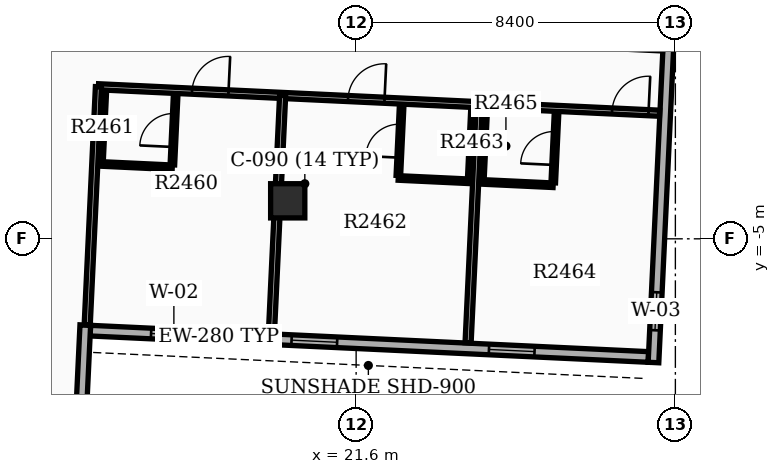
"""IFC4 building model, lengths in metres.
Left out: names, types, materials, properties, quantities, classifications, styles, units other than length and angle.
Written with IfcOpenShell. Run it as: python <this file> out.ifc"""

import sys

from ifc_helpers import new_model, si_unit, direction, frame, frame_2d, origin, origin_2d, place, context, subcontext, project, spatial, rectangle, extrude, element, fill, save


model = new_model("IFC4")
c1 = context("Model", 3, precision=1e-05, world=origin(), true_north=direction((0.0, 1.0)))
c2 = subcontext(c1, "Body", "Model", "MODEL_VIEW")
j1 = project(units=[si_unit("LENGTHUNIT", "METRE"), si_unit("PLANEANGLEUNIT", "RADIAN")], contexts=[c1])
p1 = place(None, origin())
s1 = spatial("IfcSite", under=j1, at=p1, CompositionType="ELEMENT")
p2 = place(p1, origin())
s2 = spatial("IfcBuilding", under=s1, at=p2, CompositionType="ELEMENT")
p3 = place(p2, frame((0.0, 0.0, 156.6)))
s3 = spatial("IfcBuildingStorey", under=s2, at=p3, CompositionType="ELEMENT", Elevation=156.6)
p4 = place(p3, frame((19.8, -4.0, 0.0), z_axis=(0.0, 0.0, 1.0), x_axis=(1.0, 0.0, 0.0)))
e1 = element("IfcColumn", 1, at=p4, inside=s3, PredefinedType="COLUMN", context=c2, shape_type="SweptSolid", body=[
    extrude(rectangle(XDim=0.9, YDim=0.9, at=origin_2d()), origin(), (0.0, 0.0, 1.0), 3.9),
])
p5 = place(p3, frame((14.607, -7.416, 0.0), z_axis=(0.0, 0.0, 1.0), x_axis=(0.998889342735, -0.047117735191, 0.0)))
e2 = element("IfcWall", 2, at=p5, inside=s3, PredefinedType="STANDARD", context=c2, shape_type="SweptSolid", body=[
    extrude(rectangle(XDim=14.7, YDim=0.28, at=frame_2d((7.35, 0.0))), origin(), (0.0, 0.0, 1.0), 2.97),
])
p6 = place(p5, frame((1.6, 0.0, 0.8)))
e3 = element("IfcOpeningElement", 3, at=p6, cuts=e2, PredefinedType="OPENING", context=c2, shape_type="SweptSolid", body=[
    extrude(rectangle(XDim=1.2, YDim=1.6, at=frame_2d((0.6, 0.8))), frame((0.0, 0.15, 0.0), z_axis=(0.0, -1.0, 0.0), x_axis=(1.0, 0.0, 0.0)), (0.0, 0.0, 1.0), 0.3),
])
p7 = place(p5, frame((5.3, 0.0, 0.8)))
e4 = element("IfcOpeningElement", 4, at=p7, cuts=e2, PredefinedType="OPENING", context=c2, shape_type="SweptSolid", body=[
    extrude(rectangle(XDim=1.2, YDim=1.6, at=frame_2d((0.6, 0.8))), frame((0.0, 0.15, 0.0), z_axis=(0.0, -1.0, 0.0), x_axis=(1.0, 0.0, 0.0)), (0.0, 0.0, 1.0), 0.3),
])
p8 = place(p5, frame((10.5, 0.0, 0.8)))
e5 = element("IfcOpeningElement", 5, at=p8, cuts=e2, PredefinedType="OPENING", context=c2, shape_type="SweptSolid", body=[
    extrude(rectangle(XDim=1.2, YDim=1.6, at=frame_2d((0.6, 0.8))), frame((0.0, 0.15, 0.0), z_axis=(0.0, -1.0, 0.0), x_axis=(1.0, 0.0, 0.0)), (0.0, 0.0, 1.0), 0.3),
])
p9 = place(p3, frame((29.424, -8.255, 0.0), z_axis=(0.0, 0.0, 1.0), x_axis=(0.047101845086, 0.998890092147, 0.0)))
e6 = element("IfcWall", 6, at=p9, inside=s3, PredefinedType="STANDARD", context=c2, shape_type="SweptSolid", body=[
    extrude(rectangle(XDim=13.72, YDim=0.28, at=frame_2d((6.86, 0.0))), origin(), (0.0, 0.0, 1.0), 2.97),
])
p10 = place(p9, frame((0.85, 0.0, 0.85)))
e7 = element("IfcOpeningElement", 7, at=p10, cuts=e6, PredefinedType="OPENING", context=c2, shape_type="SweptSolid", body=[
    extrude(rectangle(XDim=1.0, YDim=1.5, at=frame_2d((0.5, 0.75))), frame((0.0, 0.15, 0.0), z_axis=(0.0, -1.0, 0.0), x_axis=(1.0, 0.0, 0.0)), (0.0, 0.0, 1.0), 0.3),
])
p11 = place(p3, frame((14.474, -7.27, 0.0), z_axis=(0.0, 0.0, 1.0), x_axis=(-0.04712043756, -0.998889215261, 0.0)))
e8 = element("IfcWall", 8, at=p11, inside=s3, PredefinedType="STANDARD", context=c2, shape_type="SweptSolid", body=[
    extrude(rectangle(XDim=6.86, YDim=0.28, at=frame_2d((3.43, 0.0))), origin(), (0.0, 0.0, 1.0), 2.97),
])
p12 = place(p3, frame((14.819, -0.999, 0.0), z_axis=(0.0, 0.0, 1.0), x_axis=(0.99889000272, -0.04710374153, 0.0)))
e9 = element("IfcWall", 9, at=p12, inside=s3, PredefinedType="PARTITIONING", context=c2, shape_type="SweptSolid", body=[
    extrude(rectangle(XDim=14.782, YDim=0.16, at=frame_2d((7.391, 0.0))), origin(), (0.0, 0.0, 1.0), 2.96),
])
p13 = place(p12, frame((2.465, 0.0, 0.0)))
e10 = element("IfcOpeningElement", 10, at=p13, cuts=e9, PredefinedType="OPENING", context=c2, shape_type="SweptSolid", body=[
    extrude(rectangle(XDim=0.96, YDim=2.15, at=frame_2d((0.48, 1.075))), frame((0.0, 0.09, 0.0), z_axis=(0.0, -1.0, 0.0), x_axis=(1.0, 0.0, 0.0)), (0.0, 0.0, 1.0), 0.18),
])
p14 = place(p12, frame((6.575, 0.0, 0.0)))
e11 = element("IfcOpeningElement", 11, at=p14, cuts=e9, PredefinedType="OPENING", context=c2, shape_type="SweptSolid", body=[
    extrude(rectangle(XDim=0.96, YDim=2.15, at=frame_2d((0.48, 1.075))), frame((0.0, 0.09, 0.0), z_axis=(0.0, -1.0, 0.0), x_axis=(1.0, 0.0, 0.0)), (0.0, 0.0, 1.0), 0.18),
])
p15 = place(p12, frame((13.53, 0.0, 0.0)))
e12 = element("IfcOpeningElement", 12, at=p15, cuts=e9, PredefinedType="OPENING", context=c2, shape_type="SweptSolid", body=[
    extrude(rectangle(XDim=0.96, YDim=2.15, at=frame_2d((0.48, 1.075))), frame((0.0, 0.09, 0.0), z_axis=(0.0, -1.0, 0.0), x_axis=(1.0, 0.0, 0.0)), (0.0, 0.0, 1.0), 0.18),
])
for number, where, z_axis, x_axis in (
    (13, (14.819, -0.999, 0.0), (0.0, 0.0, 1.0), (-0.047, -0.999, 0.0)),
    (14, (19.666, -1.228, 0.0), (0.0, 0.0, 1.0), (-0.047, -0.999, 0.0)),
):
    element("IfcWall", number, at=place(p3, frame(where, z_axis=z_axis, x_axis=x_axis)), inside=s3, PredefinedType="PARTITIONING", context=c2, shape_type="SweptSolid", body=[
        extrude(rectangle(XDim=6.272, YDim=0.16, at=frame_2d((3.136, 0.0))), origin(), (0.0, 0.0, 1.0), 2.96),
    ])
p16 = place(p3, frame((16.765, -3.053, 0.0), z_axis=(0.0, 0.0, 1.0), x_axis=(0.047087116047, 0.998890786574, 0.0)))
e15 = element("IfcWall", 15, at=p16, inside=s3, PredefinedType="PARTITIONING", context=c2, shape_type="SweptSolid", body=[
    extrude(rectangle(XDim=1.82, YDim=0.12, at=frame_2d((0.91, 0.0))), origin(), (0.0, 0.0, 1.0), 2.96),
])
p17 = place(p16, frame((0.47, 0.0, 0.0)))
e16 = element("IfcOpeningElement", 16, at=p17, cuts=e15, PredefinedType="OPENING", context=c2, shape_type="SweptSolid", body=[
    extrude(rectangle(XDim=0.88, YDim=2.1, at=frame_2d((0.44, 1.05))), frame((0.0, 0.07, 0.0), z_axis=(0.0, -1.0, 0.0), x_axis=(1.0, 0.0, 0.0)), (0.0, 0.0, 1.0), 0.14),
])
p18 = place(p3, frame((14.887, -2.965, 0.0), z_axis=(0.0, 0.0, 1.0), x_axis=(0.047080807099, 0.998891083954, 0.0)))
e17 = element("IfcWall", 17, at=p18, inside=s3, PredefinedType="PARTITIONING", context=c2, shape_type="SweptSolid", body=[
    extrude(rectangle(XDim=1.82, YDim=0.12, at=frame_2d((0.91, 0.0))), origin(), (0.0, 0.0, 1.0), 2.96),
])
p19 = place(p3, frame((14.884, -3.03, 0.0), z_axis=(0.0, 0.0, 1.0), x_axis=(0.998894425757, -0.04700985207, 0.0)))
e18 = element("IfcWall", 18, at=p19, inside=s3, PredefinedType="PARTITIONING", context=c2, shape_type="SweptSolid", body=[
    extrude(rectangle(XDim=1.88, YDim=0.12, at=frame_2d((0.94, 0.0))), origin(), (0.0, 0.0, 1.0), 2.96),
])
p20 = place(p3, frame((24.841, -1.472, 0.0), z_axis=(0.0, 0.0, 1.0), x_axis=(-0.047099102485, -0.998890221468, 0.0)))
e19 = element("IfcWall", 19, at=p20, inside=s3, PredefinedType="PARTITIONING", context=c2, shape_type="SweptSolid", body=[
    extrude(rectangle(XDim=6.272, YDim=0.16, at=frame_2d((3.136, 0.0))), origin(), (0.0, 0.0, 1.0), 2.96),
])
p21 = place(p3, frame((22.711, -3.333, 0.0), z_axis=(0.0, 0.0, 1.0), x_axis=(0.047087116047, 0.998890786574, 0.0)))
e20 = element("IfcWall", 20, at=p21, inside=s3, PredefinedType="PARTITIONING", context=c2, shape_type="SweptSolid", body=[
    extrude(rectangle(XDim=1.82, YDim=0.12, at=frame_2d((0.91, 0.0))), origin(), (0.0, 0.0, 1.0), 2.96),
])
p22 = place(p21, frame((0.47, 0.0, 0.0)))
e21 = element("IfcOpeningElement", 21, at=p22, cuts=e20, PredefinedType="OPENING", context=c2, shape_type="SweptSolid", body=[
    extrude(rectangle(XDim=0.88, YDim=2.1, at=frame_2d((0.44, 1.05))), frame((0.0, 0.07, 0.0), z_axis=(0.0, -1.0, 0.0), x_axis=(1.0, 0.0, 0.0)), (0.0, 0.0, 1.0), 0.14),
])
p23 = place(p3, frame((24.589, -3.422, 0.0), z_axis=(0.0, 0.0, 1.0), x_axis=(0.047080807099, 0.998891083954, 0.0)))
e22 = element("IfcWall", 22, at=p23, inside=s3, PredefinedType="PARTITIONING", context=c2, shape_type="SweptSolid", body=[
    extrude(rectangle(XDim=1.82, YDim=0.12, at=frame_2d((0.91, 0.0))), origin(), (0.0, 0.0, 1.0), 2.96),
])
p24 = place(p3, frame((22.708, -3.398, 0.0), z_axis=(0.0, 0.0, 1.0), x_axis=(0.998888319371, -0.047139425368, 0.0)))
e23 = element("IfcWall", 23, at=p24, inside=s3, PredefinedType="PARTITIONING", context=c2, shape_type="SweptSolid", body=[
    extrude(rectangle(XDim=1.88, YDim=0.12, at=frame_2d((0.94, 0.0))), origin(), (0.0, 0.0, 1.0), 2.96),
])
p25 = place(p3, frame((26.787, -3.526, 0.0), z_axis=(0.0, 0.0, 1.0), x_axis=(0.047087116047, 0.998890786574, 0.0)))
e24 = element("IfcWall", 24, at=p25, inside=s3, PredefinedType="PARTITIONING", context=c2, shape_type="SweptSolid", body=[
    extrude(rectangle(XDim=1.82, YDim=0.12, at=frame_2d((0.91, 0.0))), origin(), (0.0, 0.0, 1.0), 2.96),
])
p26 = place(p25, frame((0.47, 0.0, 0.0)))
e25 = element("IfcOpeningElement", 25, at=p26, cuts=e24, PredefinedType="OPENING", context=c2, shape_type="SweptSolid", body=[
    extrude(rectangle(XDim=0.88, YDim=2.1, at=frame_2d((0.44, 1.05))), frame((0.0, 0.07, 0.0), z_axis=(0.0, -1.0, 0.0), x_axis=(1.0, 0.0, 0.0)), (0.0, 0.0, 1.0), 0.14),
])
p27 = place(p3, frame((24.909, -3.437, 0.0), z_axis=(0.0, 0.0, 1.0), x_axis=(0.047080807099, 0.998891083954, 0.0)))
e26 = element("IfcWall", 26, at=p27, inside=s3, PredefinedType="PARTITIONING", context=c2, shape_type="SweptSolid", body=[
    extrude(rectangle(XDim=1.82, YDim=0.12, at=frame_2d((0.91, 0.0))), origin(), (0.0, 0.0, 1.0), 2.96),
])
p28 = place(p3, frame((24.906, -3.502, 0.0), z_axis=(0.0, 0.0, 1.0), x_axis=(0.998888319371, -0.047139425368, 0.0)))
e27 = element("IfcWall", 27, at=p28, inside=s3, PredefinedType="PARTITIONING", context=c2, shape_type="SweptSolid", body=[
    extrude(rectangle(XDim=1.88, YDim=0.12, at=frame_2d((0.94, 0.0))), origin(), (0.0, 0.0, 1.0), 2.96),
])
p29 = place(p6, origin())
e28 = element("IfcWindow", 28, at=p29, inside=s3, PartitioningType="SINGLE_PANEL", PredefinedType="WINDOW", context=c2, shape_type="SweptSolid", body=[
    extrude(rectangle(XDim=1.2, YDim=1.6, at=frame_2d((0.6, 0.8))), frame((0.0, 0.03, 0.0), z_axis=(0.0, -1.0, 0.0), x_axis=(1.0, 0.0, 0.0)), (0.0, 0.0, 1.0), 0.06),
])
fill(e3, e28)
p30 = place(p7, origin())
e29 = element("IfcWindow", 29, at=p30, inside=s3, PartitioningType="SINGLE_PANEL", PredefinedType="WINDOW", context=c2, shape_type="SweptSolid", body=[
    extrude(rectangle(XDim=1.2, YDim=1.6, at=frame_2d((0.6, 0.8))), frame((0.0, 0.03, 0.0), z_axis=(0.0, -1.0, 0.0), x_axis=(1.0, 0.0, 0.0)), (0.0, 0.0, 1.0), 0.06),
])
fill(e4, e29)
p31 = place(p8, origin())
e30 = element("IfcWindow", 30, at=p31, inside=s3, PartitioningType="SINGLE_PANEL", PredefinedType="WINDOW", context=c2, shape_type="SweptSolid", body=[
    extrude(rectangle(XDim=1.2, YDim=1.6, at=frame_2d((0.6, 0.8))), frame((0.0, 0.03, 0.0), z_axis=(0.0, -1.0, 0.0), x_axis=(1.0, 0.0, 0.0)), (0.0, 0.0, 1.0), 0.06),
])
fill(e5, e30)
p32 = place(p10, origin())
e31 = element("IfcWindow", 31, at=p32, inside=s3, PartitioningType="SINGLE_PANEL", PredefinedType="WINDOW", context=c2, shape_type="SweptSolid", body=[
    extrude(rectangle(XDim=1.0, YDim=1.5, at=frame_2d((0.5, 0.75))), frame((0.0, 0.03, 0.0), z_axis=(0.0, -1.0, 0.0), x_axis=(1.0, 0.0, 0.0)), (0.0, 0.0, 1.0), 0.06),
])
fill(e7, e31)
p33 = place(p13, origin())
e32 = element("IfcDoor", 32, at=p33, inside=s3, OperationType="SINGLE_SWING_RIGHT", PredefinedType="DOOR", context=c2, shape_type="SweptSolid", body=[
    extrude(rectangle(XDim=0.96, YDim=2.15, at=frame_2d((0.48, 1.075))), frame((0.0, 0.025, 0.0), z_axis=(0.0, -1.0, 0.0), x_axis=(1.0, 0.0, 0.0)), (0.0, 0.0, 1.0), 0.05),
])
fill(e10, e32)
p34 = place(p17, origin())
e33 = element("IfcDoor", 33, at=p34, inside=s3, OperationType="SINGLE_SWING_LEFT", PredefinedType="DOOR", context=c2, shape_type="SweptSolid", body=[
    extrude(rectangle(XDim=0.88, YDim=2.1, at=frame_2d((0.44, 1.05))), frame((0.0, 0.025, 0.0), z_axis=(0.0, -1.0, 0.0), x_axis=(1.0, 0.0, 0.0)), (0.0, 0.0, 1.0), 0.05),
])
fill(e16, e33)
p35 = place(p14, origin())
e34 = element("IfcDoor", 34, at=p35, inside=s3, OperationType="SINGLE_SWING_RIGHT", PredefinedType="DOOR", context=c2, shape_type="SweptSolid", body=[
    extrude(rectangle(XDim=0.96, YDim=2.15, at=frame_2d((0.48, 1.075))), frame((0.0, 0.025, 0.0), z_axis=(0.0, -1.0, 0.0), x_axis=(1.0, 0.0, 0.0)), (0.0, 0.0, 1.0), 0.05),
])
fill(e11, e34)
p36 = place(p22, origin())
e35 = element("IfcDoor", 35, at=p36, inside=s3, OperationType="SINGLE_SWING_LEFT", PredefinedType="DOOR", context=c2, shape_type="SweptSolid", body=[
    extrude(rectangle(XDim=0.88, YDim=2.1, at=frame_2d((0.44, 1.05))), frame((0.0, 0.025, 0.0), z_axis=(0.0, -1.0, 0.0), x_axis=(1.0, 0.0, 0.0)), (0.0, 0.0, 1.0), 0.05),
])
fill(e21, e35)
p37 = place(p15, origin())
e36 = element("IfcDoor", 36, at=p37, inside=s3, OperationType="SINGLE_SWING_RIGHT", PredefinedType="DOOR", context=c2, shape_type="SweptSolid", body=[
    extrude(rectangle(XDim=0.96, YDim=2.15, at=frame_2d((0.48, 1.075))), frame((0.0, 0.025, 0.0), z_axis=(0.0, -1.0, 0.0), x_axis=(1.0, 0.0, 0.0)), (0.0, 0.0, 1.0), 0.05),
])
fill(e12, e36)
p38 = place(p26, origin())
e37 = element("IfcDoor", 37, at=p38, inside=s3, OperationType="SINGLE_SWING_LEFT", PredefinedType="DOOR", context=c2, shape_type="SweptSolid", body=[
    extrude(rectangle(XDim=0.88, YDim=2.1, at=frame_2d((0.44, 1.05))), frame((0.0, 0.025, 0.0), z_axis=(0.0, -1.0, 0.0), x_axis=(1.0, 0.0, 0.0)), (0.0, 0.0, 1.0), 0.05),
])
fill(e25, e37)
save(model, sys.argv[1])
